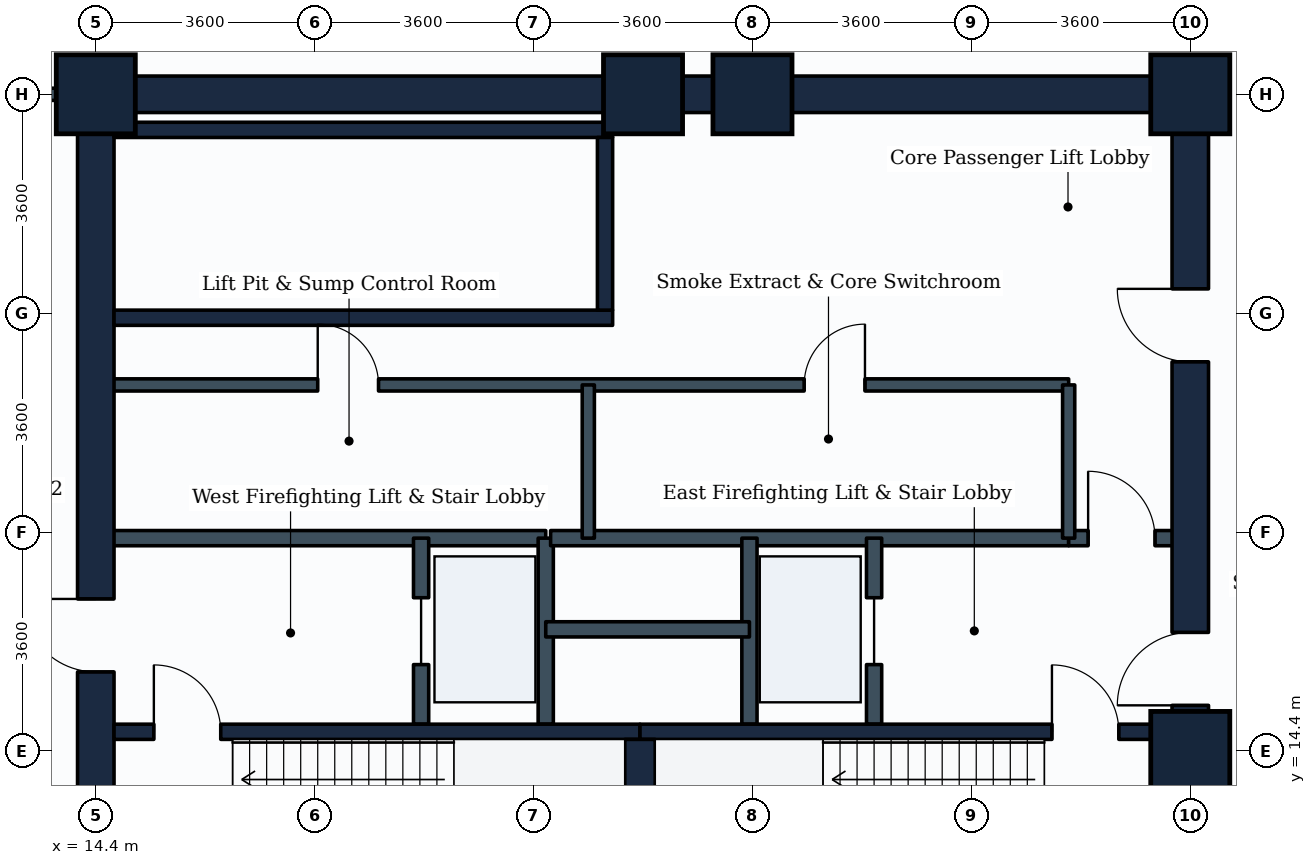
"""IFC4 building model, lengths in metres.
Left out: names, types, materials, properties, quantities, classifications, styles, units other than length and angle.
Written with IfcOpenShell. Run it as: python <this file> out.ifc"""

import sys

from ifc_helpers import new_model, si_unit, direction, frame, frame_2d, origin, origin_2d, place, context, subcontext, project, spatial, rectangle, extrude, element, fill, save


model = new_model("IFC4")
c1 = context("Model", 3, precision=1e-05, world=origin(), true_north=direction((0.0, 1.0)))
c2 = subcontext(c1, "Body", "Model", "MODEL_VIEW")
j1 = project(units=[si_unit("LENGTHUNIT", "METRE"), si_unit("PLANEANGLEUNIT", "RADIAN")], contexts=[c1])
p1 = place(None, origin())
s1 = spatial("IfcSite", under=j1, at=p1, CompositionType="ELEMENT")
p2 = place(p1, origin())
s2 = spatial("IfcBuilding", under=s1, at=p2, CompositionType="ELEMENT")
p3 = place(p2, frame((0.0, 0.0, -9.6)))
s3 = spatial("IfcBuildingStorey", under=s2, at=p3, CompositionType="ELEMENT", Elevation=-9.6)
for number, where, z_axis, x_axis in (
    (1, (14.4, 25.2, 0.0), (0.0, 0.0, 1.0), (1.0, 0.0, 0.0)),
    (2, (23.4, 25.2, 0.0), (0.0, 0.0, 1.0), (1.0, 0.0, 0.0)),
    (3, (25.2, 25.2, 0.0), (0.0, 0.0, 1.0), (1.0, 0.0, 0.0)),
    (4, (32.4, 14.4, 0.0), (0.0, 0.0, 1.0), (1.0, 0.0, 0.0)),
    (5, (32.4, 25.2, 0.0), (0.0, 0.0, 1.0), (1.0, 0.0, 0.0)),
):
    element("IfcColumn", number, at=place(p3, frame(where, z_axis=z_axis, x_axis=x_axis)), inside=s3, PredefinedType="COLUMN", context=c2, shape_type="SweptSolid", body=[
        extrude(rectangle(XDim=1.3, YDim=1.3, at=origin_2d()), origin(), (0.0, 0.0, 1.0), 4.8),
    ])
p4 = place(p3, frame((14.4, 25.2, 0.0), z_axis=(0.0, 0.0, 1.0), x_axis=(1.0, 0.0, 0.0)))
e6 = element("IfcWall", 6, at=p4, inside=s3, PredefinedType="SHEAR", context=c2, shape_type="SweptSolid", body=[
    extrude(rectangle(XDim=18.0, YDim=0.6, at=frame_2d((9.0, 0.0))), origin(), (0.0, 0.0, 1.0), 4.45),
])
p5 = place(p3, frame((14.4, 10.8, 0.0), z_axis=(0.0, 0.0, 1.0), x_axis=(0.0, 1.0, 0.0)))
e7 = element("IfcWall", 7, at=p5, inside=s3, PredefinedType="SHEAR", context=c2, shape_type="SweptSolid", body=[
    extrude(rectangle(XDim=14.4, YDim=0.6, at=frame_2d((7.2, 0.0))), origin(), (0.0, 0.0, 1.0), 4.45),
])
p6 = place(p5, frame((4.9, 0.0, 0.0)))
e8 = element("IfcOpeningElement", 8, at=p6, cuts=e7, PredefinedType="OPENING", context=c2, shape_type="SweptSolid", body=[
    extrude(rectangle(XDim=1.2, YDim=2.1, at=frame_2d((0.6, 1.05))), frame((0.0, 0.31, 0.0), z_axis=(0.0, -1.0, 0.0), x_axis=(1.0, 0.0, 0.0)), (0.0, 0.0, 1.0), 0.62),
])
p7 = place(p3, frame((32.4, 10.8, 0.0), z_axis=(0.0, 0.0, 1.0), x_axis=(0.0, 1.0, 0.0)))
e9 = element("IfcWall", 9, at=p7, inside=s3, PredefinedType="SHEAR", context=c2, shape_type="SweptSolid", body=[
    extrude(rectangle(XDim=14.4, YDim=0.6, at=frame_2d((7.2, 0.0))), origin(), (0.0, 0.0, 1.0), 4.45),
])
p8 = place(p7, frame((4.35, 0.0, 0.0)))
e10 = element("IfcOpeningElement", 10, at=p8, cuts=e9, PredefinedType="OPENING", context=c2, shape_type="SweptSolid", body=[
    extrude(rectangle(XDim=1.2, YDim=2.1, at=frame_2d((0.6, 1.05))), frame((0.0, 0.31, 0.0), z_axis=(0.0, -1.0, 0.0), x_axis=(1.0, 0.0, 0.0)), (0.0, 0.0, 1.0), 0.62),
])
p9 = place(p7, frame((10.0, 0.0, 0.0)))
e11 = element("IfcOpeningElement", 11, at=p9, cuts=e9, PredefinedType="OPENING", context=c2, shape_type="SweptSolid", body=[
    extrude(rectangle(XDim=1.2, YDim=2.1, at=frame_2d((0.6, 1.05))), frame((0.0, 0.31, 0.0), z_axis=(0.0, -1.0, 0.0), x_axis=(1.0, 0.0, 0.0)), (0.0, 0.0, 1.0), 0.62),
])
p10 = place(p3, frame((14.7, 14.715, 0.0), z_axis=(0.0, 0.0, 1.0), x_axis=(1.0, 0.0, 0.0)))
e12 = element("IfcWall", 12, at=p10, inside=s3, PredefinedType="SHEAR", context=c2, shape_type="SweptSolid", body=[
    extrude(rectangle(XDim=8.65, YDim=0.25, at=frame_2d((4.325, 0.0))), origin(), (0.0, 0.0, 1.0), 4.45),
])
p11 = place(p10, frame((0.655, 0.0, 0.0)))
e13 = element("IfcOpeningElement", 13, at=p11, cuts=e12, PredefinedType="OPENING", context=c2, shape_type="SweptSolid", body=[
    extrude(rectangle(XDim=1.1, YDim=2.1, at=frame_2d((0.55, 1.05))), frame((0.0, 0.135, 0.0), z_axis=(0.0, -1.0, 0.0), x_axis=(1.0, 0.0, 0.0)), (0.0, 0.0, 1.0), 0.27),
])
p12 = place(p3, frame((23.35, 14.715, 0.0), z_axis=(0.0, 0.0, 1.0), x_axis=(1.0, 0.0, 0.0)))
e14 = element("IfcWall", 14, at=p12, inside=s3, PredefinedType="SHEAR", context=c2, shape_type="SweptSolid", body=[
    extrude(rectangle(XDim=8.75, YDim=0.25, at=frame_2d((4.375, 0.0))), origin(), (0.0, 0.0, 1.0), 4.45),
])
p13 = place(p12, frame((6.775, 0.0, 0.0)))
e15 = element("IfcOpeningElement", 15, at=p13, cuts=e14, PredefinedType="OPENING", context=c2, shape_type="SweptSolid", body=[
    extrude(rectangle(XDim=1.1, YDim=2.1, at=frame_2d((0.55, 1.05))), frame((0.0, 0.135, 0.0), z_axis=(0.0, -1.0, 0.0), x_axis=(1.0, 0.0, 0.0)), (0.0, 0.0, 1.0), 0.27),
])
p14 = place(p3, frame((23.35, 11.75, 0.0), z_axis=(0.0, 0.0, 1.0), x_axis=(0.0, 1.0, 0.0)))
e16 = element("IfcWall", 16, at=p14, inside=s3, PredefinedType="SHEAR", context=c2, shape_type="SweptSolid", body=[
    extrude(rectangle(XDim=2.84, YDim=0.5, at=frame_2d((1.42, 0.0))), origin(), (0.0, 0.0, 1.0), 4.45),
])
for number, where, z_axis, x_axis in (
    (17, (14.7, 21.525, 0.0), (0.0, 0.0, 1.0), (1.0, 0.0, 0.0)),
    (18, (14.7, 24.615, 0.0), (0.0, 0.0, 1.0), (1.0, 0.0, 0.0)),
):
    element("IfcWall", number, at=place(p3, frame(where, z_axis=z_axis, x_axis=x_axis)), inside=s3, PredefinedType="SHEAR", context=c2, shape_type="SweptSolid", body=[
        extrude(rectangle(XDim=8.2, YDim=0.25, at=frame_2d((4.1, 0.0))), origin(), (0.0, 0.0, 1.0), 4.45),
    ])
p15 = place(p3, frame((22.775, 21.65, 0.0), z_axis=(0.0, 0.0, 1.0), x_axis=(0.0, 1.0, 0.0)))
e19 = element("IfcWall", 19, at=p15, inside=s3, PredefinedType="SHEAR", context=c2, shape_type="SweptSolid", body=[
    extrude(rectangle(XDim=2.84, YDim=0.25, at=frame_2d((1.42, 0.0))), origin(), (0.0, 0.0, 1.0), 4.45),
])
p16 = place(p3, frame((14.65, 17.9, 0.0), z_axis=(0.0, 0.0, 1.0), x_axis=(1.0, 0.0, 0.0)))
e20 = element("IfcWall", 20, at=p16, inside=s3, PredefinedType="PARTITIONING", context=c2, shape_type="SweptSolid", body=[
    extrude(rectangle(XDim=7.15, YDim=0.25, at=frame_2d((3.575, 0.0))), origin(), (0.0, 0.0, 1.0), 4.435),
])
p17 = place(p3, frame((19.75, 14.84, 0.0), z_axis=(0.0, 0.0, 1.0), x_axis=(0.0, 1.0, 0.0)))
e21 = element("IfcWall", 21, at=p17, inside=s3, PredefinedType="PARTITIONING", context=c2, shape_type="SweptSolid", body=[
    extrude(rectangle(XDim=3.06, YDim=0.25, at=frame_2d((1.53, 0.0))), origin(), (0.0, 0.0, 1.0), 4.435),
])
p18 = place(p17, frame((0.98, 0.0, 0.0)))
e22 = element("IfcOpeningElement", 22, at=p18, cuts=e21, PredefinedType="OPENING", context=c2, shape_type="SweptSolid", body=[
    extrude(rectangle(XDim=1.1, YDim=2.1, at=frame_2d((0.55, 1.05))), frame((0.0, 0.135, 0.0), z_axis=(0.0, -1.0, 0.0), x_axis=(1.0, 0.0, 0.0)), (0.0, 0.0, 1.0), 0.27),
])
p19 = place(p3, frame((21.8, 14.84, 0.0), z_axis=(0.0, 0.0, 1.0), x_axis=(0.0, 1.0, 0.0)))
e23 = element("IfcWall", 23, at=p19, inside=s3, PredefinedType="PARTITIONING", context=c2, shape_type="SweptSolid", body=[
    extrude(rectangle(XDim=3.06, YDim=0.25, at=frame_2d((1.53, 0.0))), origin(), (0.0, 0.0, 1.0), 4.435),
])
p20 = place(p3, frame((21.88, 17.9, 0.0), z_axis=(0.0, 0.0, 1.0), x_axis=(1.0, 0.0, 0.0)))
e24 = element("IfcWall", 24, at=p20, inside=s3, PredefinedType="PARTITIONING", context=c2, shape_type="SweptSolid", body=[
    extrude(rectangle(XDim=8.52, YDim=0.25, at=frame_2d((4.26, 0.0))), origin(), (0.0, 0.0, 1.0), 4.435),
])
p21 = place(p3, frame((30.4, 17.9, 0.0), z_axis=(0.0, 0.0, 1.0), x_axis=(1.0, 0.0, 0.0)))
e25 = element("IfcWall", 25, at=p21, inside=s3, PredefinedType="PARTITIONING", context=c2, shape_type="SweptSolid", body=[
    extrude(rectangle(XDim=1.75, YDim=0.25, at=frame_2d((0.875, 0.0))), origin(), (0.0, 0.0, 1.0), 4.435),
])
p22 = place(p21, frame((0.32, 0.0, 0.0)))
e26 = element("IfcOpeningElement", 26, at=p22, cuts=e25, PredefinedType="OPENING", context=c2, shape_type="SweptSolid", body=[
    extrude(rectangle(XDim=1.1, YDim=2.1, at=frame_2d((0.55, 1.05))), frame((0.0, 0.135, 0.0), z_axis=(0.0, -1.0, 0.0), x_axis=(1.0, 0.0, 0.0)), (0.0, 0.0, 1.0), 0.27),
])
p23 = place(p3, frame((25.15, 14.84, 0.0), z_axis=(0.0, 0.0, 1.0), x_axis=(0.0, 1.0, 0.0)))
e27 = element("IfcWall", 27, at=p23, inside=s3, PredefinedType="PARTITIONING", context=c2, shape_type="SweptSolid", body=[
    extrude(rectangle(XDim=3.06, YDim=0.25, at=frame_2d((1.53, 0.0))), origin(), (0.0, 0.0, 1.0), 4.435),
])
p24 = place(p3, frame((27.2, 14.84, 0.0), z_axis=(0.0, 0.0, 1.0), x_axis=(0.0, 1.0, 0.0)))
e28 = element("IfcWall", 28, at=p24, inside=s3, PredefinedType="PARTITIONING", context=c2, shape_type="SweptSolid", body=[
    extrude(rectangle(XDim=3.06, YDim=0.25, at=frame_2d((1.53, 0.0))), origin(), (0.0, 0.0, 1.0), 4.435),
])
p25 = place(p24, frame((0.98, 0.0, 0.0)))
e29 = element("IfcOpeningElement", 29, at=p25, cuts=e28, PredefinedType="OPENING", context=c2, shape_type="SweptSolid", body=[
    extrude(rectangle(XDim=1.1, YDim=2.1, at=frame_2d((0.55, 1.05))), frame((0.0, 0.135, 0.0), z_axis=(0.0, -1.0, 0.0), x_axis=(1.0, 0.0, 0.0)), (0.0, 0.0, 1.0), 0.27),
])
p26 = place(p3, frame((21.8, 16.4, 0.0), z_axis=(0.0, 0.0, 1.0), x_axis=(1.0, 0.0, 0.0)))
e30 = element("IfcWall", 30, at=p26, inside=s3, PredefinedType="PARTITIONING", context=c2, shape_type="SweptSolid", body=[
    extrude(rectangle(XDim=3.35, YDim=0.25, at=frame_2d((1.675, 0.0))), origin(), (0.0, 0.0, 1.0), 4.435),
])
p27 = place(p3, frame((14.65, 20.42, 0.0), z_axis=(0.0, 0.0, 1.0), x_axis=(1.0, 0.0, 0.0)))
e31 = element("IfcWall", 31, at=p27, inside=s3, PredefinedType="PARTITIONING", context=c2, shape_type="SweptSolid", body=[
    extrude(rectangle(XDim=15.75, YDim=0.2, at=frame_2d((7.875, 0.0))), origin(), (0.0, 0.0, 1.0), 4.435),
])
p28 = place(p27, frame((3.4, 0.0, 0.0)))
e32 = element("IfcOpeningElement", 32, at=p28, cuts=e31, PredefinedType="OPENING", context=c2, shape_type="SweptSolid", body=[
    extrude(rectangle(XDim=1.0, YDim=2.1, at=frame_2d((0.5, 1.05))), frame((0.0, 0.11, 0.0), z_axis=(0.0, -1.0, 0.0), x_axis=(1.0, 0.0, 0.0)), (0.0, 0.0, 1.0), 0.22),
])
p29 = place(p27, frame((11.4, 0.0, 0.0)))
e33 = element("IfcOpeningElement", 33, at=p29, cuts=e31, PredefinedType="OPENING", context=c2, shape_type="SweptSolid", body=[
    extrude(rectangle(XDim=1.0, YDim=2.1, at=frame_2d((0.5, 1.05))), frame((0.0, 0.11, 0.0), z_axis=(0.0, -1.0, 0.0), x_axis=(1.0, 0.0, 0.0)), (0.0, 0.0, 1.0), 0.22),
])
for number, where, z_axis, x_axis in (
    (34, (30.4, 17.9, 0.0), (0.0, 0.0, 1.0), (0.0, 1.0, 0.0)),
    (35, (22.5, 17.9, 0.0), (0.0, 0.0, 1.0), (0.0, 1.0, 0.0)),
):
    element("IfcWall", number, at=place(p3, frame(where, z_axis=z_axis, x_axis=x_axis)), inside=s3, PredefinedType="PARTITIONING", context=c2, shape_type="SweptSolid", body=[
        extrude(rectangle(XDim=2.52, YDim=0.2, at=frame_2d((1.26, 0.0))), origin(), (0.0, 0.0, 1.0), 4.435),
    ])
p30 = place(p3, frame((12.504, 25.2, 0.0), z_axis=(0.0, 0.0, 1.0), x_axis=(1.0, 0.0, 0.0)))
e36 = element("IfcWall", 36, at=p30, inside=s3, PredefinedType="PARTITIONING", context=c2, shape_type="SweptSolid", body=[
    extrude(rectangle(XDim=1.592, YDim=0.2, at=frame_2d((0.796, 0.0))), origin(), (0.0, 0.0, 1.0), 4.435),
])
p31 = place(p11, origin())
e37 = element("IfcDoor", 37, at=p31, inside=s3, OperationType="SINGLE_SWING_LEFT", PredefinedType="DOOR", context=c2, shape_type="SweptSolid", body=[
    extrude(rectangle(XDim=1.1, YDim=2.1, at=frame_2d((0.55, 1.05))), frame((0.0, 0.025, 0.0), z_axis=(0.0, -1.0, 0.0), x_axis=(1.0, 0.0, 0.0)), (0.0, 0.0, 1.0), 0.05),
])
fill(e13, e37)
p32 = place(p13, origin())
e38 = element("IfcDoor", 38, at=p32, inside=s3, OperationType="SINGLE_SWING_LEFT", PredefinedType="DOOR", context=c2, shape_type="SweptSolid", body=[
    extrude(rectangle(XDim=1.1, YDim=2.1, at=frame_2d((0.55, 1.05))), frame((0.0, 0.025, 0.0), z_axis=(0.0, -1.0, 0.0), x_axis=(1.0, 0.0, 0.0)), (0.0, 0.0, 1.0), 0.05),
])
fill(e15, e38)
p33 = place(p18, origin())
e39 = element("IfcDoor", 39, at=p33, inside=s3, OperationType="SLIDING_TO_LEFT", PredefinedType="DOOR", context=c2, shape_type="SweptSolid", body=[
    extrude(rectangle(XDim=1.1, YDim=2.1, at=frame_2d((0.55, 1.05))), frame((0.0, 0.025, 0.0), z_axis=(0.0, -1.0, 0.0), x_axis=(1.0, 0.0, 0.0)), (0.0, 0.0, 1.0), 0.05),
])
fill(e22, e39)
p34 = place(p25, origin())
e40 = element("IfcDoor", 40, at=p34, inside=s3, OperationType="SLIDING_TO_LEFT", PredefinedType="DOOR", context=c2, shape_type="SweptSolid", body=[
    extrude(rectangle(XDim=1.1, YDim=2.1, at=frame_2d((0.55, 1.05))), frame((0.0, 0.025, 0.0), z_axis=(0.0, -1.0, 0.0), x_axis=(1.0, 0.0, 0.0)), (0.0, 0.0, 1.0), 0.05),
])
fill(e29, e40)
p35 = place(p6, origin())
e41 = element("IfcDoor", 41, at=p35, inside=s3, OperationType="SINGLE_SWING_RIGHT", PredefinedType="DOOR", context=c2, shape_type="SweptSolid", body=[
    extrude(rectangle(XDim=1.2, YDim=2.1, at=frame_2d((0.6, 1.05))), frame((0.0, 0.025, 0.0), z_axis=(0.0, -1.0, 0.0), x_axis=(1.0, 0.0, 0.0)), (0.0, 0.0, 1.0), 0.05),
])
fill(e8, e41)
p36 = place(p8, origin())
e42 = element("IfcDoor", 42, at=p36, inside=s3, OperationType="SINGLE_SWING_LEFT", PredefinedType="DOOR", context=c2, shape_type="SweptSolid", body=[
    extrude(rectangle(XDim=1.2, YDim=2.1, at=frame_2d((0.6, 1.05))), frame((0.0, 0.025, 0.0), z_axis=(0.0, -1.0, 0.0), x_axis=(1.0, 0.0, 0.0)), (0.0, 0.0, 1.0), 0.05),
])
fill(e10, e42)
p37 = place(p22, origin())
e43 = element("IfcDoor", 43, at=p37, inside=s3, OperationType="SINGLE_SWING_LEFT", PredefinedType="DOOR", context=c2, shape_type="SweptSolid", body=[
    extrude(rectangle(XDim=1.1, YDim=2.1, at=frame_2d((0.55, 1.05))), frame((0.0, 0.025, 0.0), z_axis=(0.0, -1.0, 0.0), x_axis=(1.0, 0.0, 0.0)), (0.0, 0.0, 1.0), 0.05),
])
fill(e26, e43)
p38 = place(p9, origin())
e44 = element("IfcDoor", 44, at=p38, inside=s3, OperationType="SINGLE_SWING_RIGHT", PredefinedType="DOOR", context=c2, shape_type="SweptSolid", body=[
    extrude(rectangle(XDim=1.2, YDim=2.1, at=frame_2d((0.6, 1.05))), frame((0.0, 0.025, 0.0), z_axis=(0.0, -1.0, 0.0), x_axis=(1.0, 0.0, 0.0)), (0.0, 0.0, 1.0), 0.05),
])
fill(e11, e44)
p39 = place(p28, origin())
e45 = element("IfcDoor", 45, at=p39, inside=s3, OperationType="SINGLE_SWING_LEFT", PredefinedType="DOOR", context=c2, shape_type="SweptSolid", body=[
    extrude(rectangle(XDim=1.0, YDim=2.1, at=frame_2d((0.5, 1.05))), frame((0.0, 0.025, 0.0), z_axis=(0.0, -1.0, 0.0), x_axis=(1.0, 0.0, 0.0)), (0.0, 0.0, 1.0), 0.05),
])
fill(e32, e45)
p40 = place(p29, origin())
e46 = element("IfcDoor", 46, at=p40, inside=s3, OperationType="SINGLE_SWING_RIGHT", PredefinedType="DOOR", context=c2, shape_type="SweptSolid", body=[
    extrude(rectangle(XDim=1.0, YDim=2.1, at=frame_2d((0.5, 1.05))), frame((0.0, 0.025, 0.0), z_axis=(0.0, -1.0, 0.0), x_axis=(1.0, 0.0, 0.0)), (0.0, 0.0, 1.0), 0.05),
])
fill(e33, e46)
save(model, sys.argv[1])
